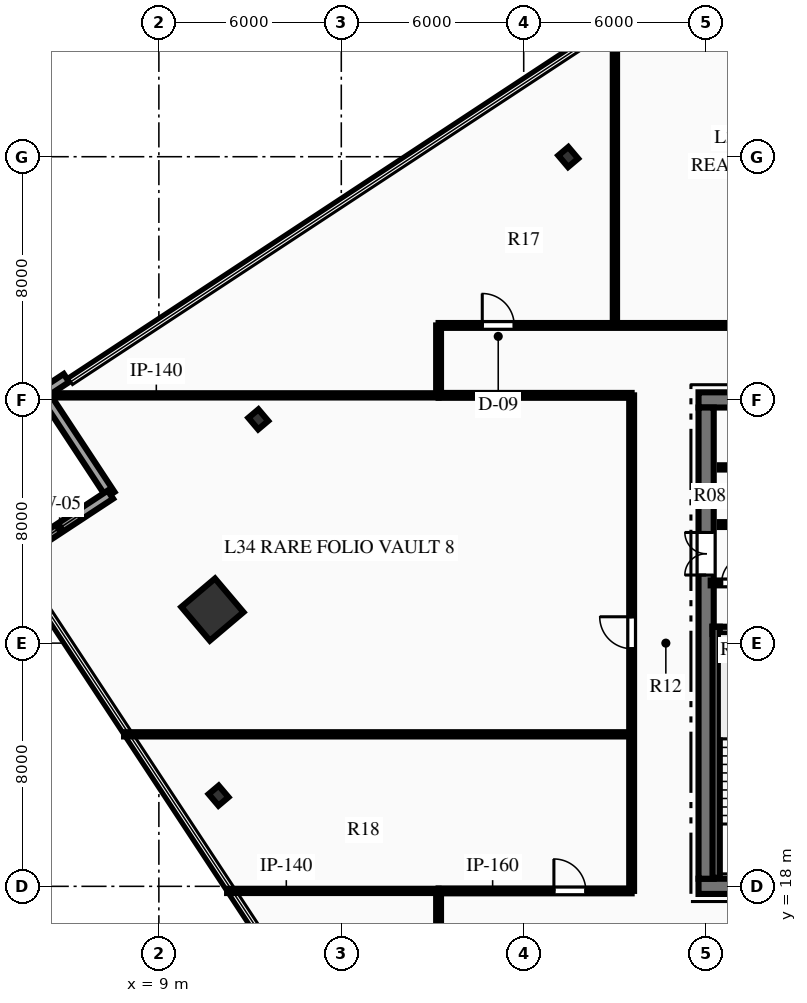
"""IFC4 building model, lengths in metres.
Left out: names, types, materials, properties, quantities, classifications, styles, units other than length and angle.
Written with IfcOpenShell. Run it as: python <this file> out.ifc"""

import sys

from ifc_helpers import new_model, si_unit, direction, frame, frame_2d, origin, origin_2d, place, context, subcontext, project, spatial, rectangle, hollow_rectangle, i_section, extrude, element, fill, save


model = new_model("IFC4")
c1 = context("Model", 3, precision=1e-05, world=origin(), true_north=direction((0.0, 1.0)))
c2 = subcontext(c1, "Body", "Model", "MODEL_VIEW")
j1 = project(units=[si_unit("LENGTHUNIT", "METRE"), si_unit("PLANEANGLEUNIT", "RADIAN")], contexts=[c1])
p1 = place(None, origin())
s1 = spatial("IfcSite", under=j1, at=p1, CompositionType="ELEMENT")
p2 = place(p1, origin())
s2 = spatial("IfcBuilding", under=s1, at=p2, CompositionType="ELEMENT")
p3 = place(p2, frame((0.0, 0.0, 140.7)))
s3 = spatial("IfcBuildingStorey", under=s2, at=p3, CompositionType="ELEMENT", Elevation=140.7)
p4 = place(p3, frame((26.75, 18.0, 0.0), z_axis=(0.0, 0.0, 1.0), x_axis=(1.0, 0.0, 0.0)))
e1 = element("IfcWall", 1, at=p4, inside=s3, PredefinedType="SHEAR", context=c2, shape_type="SweptSolid", body=[
    extrude(rectangle(XDim=18.5, YDim=0.5, at=frame_2d((9.25, 0.0))), origin(), (0.0, 0.0, 1.0), 3.75),
])
p5 = place(p4, frame((7.35, 0.0, 0.0)))
e2 = element("IfcOpeningElement", 2, at=p5, cuts=e1, PredefinedType="OPENING", context=c2, shape_type="SweptSolid", body=[
    extrude(rectangle(XDim=1.1, YDim=2.15, at=frame_2d((0.55, 1.075))), frame((0.0, 0.26, 0.0), z_axis=(0.0, -1.0, 0.0), x_axis=(1.0, 0.0, 0.0)), (0.0, 0.0, 1.0), 0.52),
])
p6 = place(p4, frame((10.05, 0.0, 0.0)))
e3 = element("IfcOpeningElement", 3, at=p6, cuts=e1, PredefinedType="OPENING", context=c2, shape_type="SweptSolid", body=[
    extrude(rectangle(XDim=1.1, YDim=2.15, at=frame_2d((0.55, 1.075))), frame((0.0, 0.26, 0.0), z_axis=(0.0, -1.0, 0.0), x_axis=(1.0, 0.0, 0.0)), (0.0, 0.0, 1.0), 0.52),
])
p7 = place(p3, frame((26.75, 34.0, 0.0), z_axis=(0.0, 0.0, 1.0), x_axis=(1.0, 0.0, 0.0)))
e4 = element("IfcWall", 4, at=p7, inside=s3, PredefinedType="SHEAR", context=c2, shape_type="SweptSolid", body=[
    extrude(rectangle(XDim=18.5, YDim=0.5, at=frame_2d((9.25, 0.0))), origin(), (0.0, 0.0, 1.0), 3.75),
])
p8 = place(p7, frame((13.935, 0.0, 0.0)))
e5 = element("IfcOpeningElement", 5, at=p8, cuts=e4, PredefinedType="OPENING", context=c2, shape_type="SweptSolid", body=[
    extrude(rectangle(XDim=1.1, YDim=2.15, at=frame_2d((0.55, 1.075))), frame((0.0, 0.26, 0.0), z_axis=(0.0, -1.0, 0.0), x_axis=(1.0, 0.0, 0.0)), (0.0, 0.0, 1.0), 0.52),
])
p9 = place(p7, frame((16.185, 0.0, 0.0)))
e6 = element("IfcOpeningElement", 6, at=p9, cuts=e4, PredefinedType="OPENING", context=c2, shape_type="SweptSolid", body=[
    extrude(rectangle(XDim=1.1, YDim=2.15, at=frame_2d((0.55, 1.075))), frame((0.0, 0.26, 0.0), z_axis=(0.0, -1.0, 0.0), x_axis=(1.0, 0.0, 0.0)), (0.0, 0.0, 1.0), 0.52),
])
p10 = place(p3, frame((27.0, 18.25, 0.0), z_axis=(0.0, 0.0, 1.0), x_axis=(0.0, 1.0, 0.0)))
e7 = element("IfcWall", 7, at=p10, inside=s3, PredefinedType="SHEAR", context=c2, shape_type="SweptSolid", body=[
    extrude(rectangle(XDim=15.5, YDim=0.5, at=frame_2d((7.75, 0.0))), origin(), (0.0, 0.0, 1.0), 3.75),
])
p11 = place(p10, frame((9.99, 0.0, 0.0)))
e8 = element("IfcOpeningElement", 8, at=p11, cuts=e7, PredefinedType="OPENING", context=c2, shape_type="SweptSolid", body=[
    extrude(rectangle(XDim=1.4, YDim=2.2, at=frame_2d((0.7, 1.1))), frame((0.0, 0.26, 0.0), z_axis=(0.0, -1.0, 0.0), x_axis=(1.0, 0.0, 0.0)), (0.0, 0.0, 1.0), 0.52),
])
p12 = place(p3, frame((27.21, 26.42, 0.0), z_axis=(0.0, 0.0, 1.0), x_axis=(1.0, 0.0, 0.0)))
e9 = element("IfcWall", 9, at=p12, inside=s3, PredefinedType="SHEAR", context=c2, shape_type="SweptSolid", body=[
    extrude(rectangle(XDim=3.98, YDim=0.24, at=frame_2d((1.99, 0.0))), origin(), (0.0, 0.0, 1.0), 3.75),
])
p13 = place(p3, frame((27.33, 18.28, 0.0), z_axis=(0.0, 0.0, 1.0), x_axis=(0.0, 1.0, 0.0)))
e10 = element("IfcWall", 10, at=p13, inside=s3, PredefinedType="SHEAR", context=c2, shape_type="SweptSolid", body=[
    extrude(rectangle(XDim=8.26, YDim=0.24, at=frame_2d((4.13, 0.0))), origin(), (0.0, 0.0, 1.0), 3.75),
])
p14 = place(p3, frame((10.761, 27.104, 0.0), z_axis=(0.0, 0.0, 1.0), x_axis=(0.763232469783, 0.646123979643, 0.0)))
e11 = element("IfcColumn", 11, at=p14, inside=s3, PredefinedType="COLUMN", context=c2, shape_type="SweptSolid", body=[
    extrude(hollow_rectangle(XDim=1.45, YDim=1.45, WallThickness=0.07, at=origin_2d()), origin(), (0.0, 0.0, 1.0), 3.75),
])
for number, where, z_axis, x_axis in (
    (12, (22.464, 41.99, 0.0), (0.0, 0.0, 1.0), (0.763, 0.646, 0.0)),
    (13, (12.27, 33.36, 0.0), (0.0, 0.0, 1.0), (0.763, 0.646, 0.0)),
    (14, (10.963, 20.983, 0.0), (0.0, 0.0, 1.0), (0.763, 0.646, 0.0)),
):
    element("IfcColumn", number, at=place(p3, frame(where, z_axis=z_axis, x_axis=x_axis)), inside=s3, PredefinedType="COLUMN", context=c2, shape_type="SweptSolid", body=[
        extrude(i_section(OverallWidth=0.432, OverallDepth=0.498, WebThickness=0.056, FlangeThickness=0.089, at=origin_2d()), origin(), (0.0, 0.0, 1.0), 3.75),
    ])
p15 = place(p3, frame((5.207, 34.226, 0.0), z_axis=(0.0, 0.0, 1.0), x_axis=(0.83524987434, 0.549870573331, 0.0)))
e15 = element("IfcWall", 15, at=p15, inside=s3, PredefinedType="STANDARD", context=c2, shape_type="SweptSolid", body=[
    extrude(rectangle(XDim=0.9, YDim=0.32, at=frame_2d((0.45, 0.0))), origin(), (0.0, 0.0, 1.0), 3.46),
])
p16 = place(p3, frame((7.406, 30.885, 0.0), z_axis=(0.0, 0.0, 1.0), x_axis=(-0.549746530767, 0.835331522158, 0.0)))
e16 = element("IfcWall", 16, at=p16, inside=s3, PredefinedType="STANDARD", context=c2, shape_type="SweptSolid", body=[
    extrude(rectangle(XDim=4.0, YDim=0.32, at=frame_2d((2.0, 0.0))), origin(), (0.0, 0.0, 1.0), 3.46),
])
p17 = place(p3, frame((4.065, 28.686, 0.0), z_axis=(0.0, 0.0, 1.0), x_axis=(0.835331522158, 0.549746530767, 0.0)))
e17 = element("IfcWall", 17, at=p17, inside=s3, PredefinedType="STANDARD", context=c2, shape_type="SweptSolid", body=[
    extrude(rectangle(XDim=4.0, YDim=0.32, at=frame_2d((2.0, 0.0))), origin(), (0.0, 0.0, 1.0), 3.46),
])
p18 = place(p17, frame((1.275, 0.0, 0.85)))
e18 = element("IfcOpeningElement", 18, at=p18, cuts=e17, PredefinedType="OPENING", context=c2, shape_type="SweptSolid", body=[
    extrude(rectangle(XDim=1.45, YDim=2.05, at=frame_2d((0.725, 1.025))), frame((0.0, 0.17, 0.0), z_axis=(0.0, -1.0, 0.0), x_axis=(1.0, 0.0, 0.0)), (0.0, 0.0, 1.0), 0.34),
])
p19 = place(p3, frame((27.15, 27.98, 0.0), z_axis=(0.0, 0.0, 1.0), x_axis=(1.0, 0.0, 0.0)))
e19 = element("IfcWall", 19, at=p19, inside=s3, PredefinedType="PARTITIONING", context=c2, shape_type="SweptSolid", body=[
    extrude(rectangle(XDim=4.05, YDim=0.16, at=frame_2d((2.025, 0.0))), origin(), (0.0, 0.0, 1.0), 3.46),
])
p20 = place(p19, frame((0.36, 0.0, 0.0)))
e20 = element("IfcOpeningElement", 20, at=p20, cuts=e19, PredefinedType="OPENING", context=c2, shape_type="SweptSolid", body=[
    extrude(rectangle(XDim=0.9, YDim=2.15, at=frame_2d((0.45, 1.075))), frame((0.0, 0.09, 0.0), z_axis=(0.0, -1.0, 0.0), x_axis=(1.0, 0.0, 0.0)), (0.0, 0.0, 1.0), 0.18),
])
p21 = place(p19, frame((1.63, 0.0, 0.0)))
e21 = element("IfcOpeningElement", 21, at=p21, cuts=e19, PredefinedType="OPENING", context=c2, shape_type="SweptSolid", body=[
    extrude(rectangle(XDim=0.9, YDim=2.15, at=frame_2d((0.45, 1.075))), frame((0.0, 0.09, 0.0), z_axis=(0.0, -1.0, 0.0), x_axis=(1.0, 0.0, 0.0)), (0.0, 0.0, 1.0), 0.18),
])
p22 = place(p19, frame((2.788, 0.0, 0.0)))
e22 = element("IfcOpeningElement", 22, at=p22, cuts=e19, PredefinedType="OPENING", context=c2, shape_type="SweptSolid", body=[
    extrude(rectangle(XDim=0.9, YDim=2.15, at=frame_2d((0.45, 1.075))), frame((0.0, 0.09, 0.0), z_axis=(0.0, -1.0, 0.0), x_axis=(1.0, 0.0, 0.0)), (0.0, 0.0, 1.0), 0.18),
])
p23 = place(p3, frame((27.45, 29.9, 0.0), z_axis=(0.0, 0.0, 1.0), x_axis=(1.0, 0.0, 0.0)))
e23 = element("IfcWall", 23, at=p23, inside=s3, PredefinedType="PARTITIONING", context=c2, shape_type="SweptSolid", body=[
    extrude(rectangle(XDim=4.43, YDim=0.16, at=frame_2d((2.215, 0.0))), origin(), (0.0, 0.0, 1.0), 3.46),
])
p24 = place(p23, frame((1.675, 0.0, 0.0)))
e24 = element("IfcOpeningElement", 24, at=p24, cuts=e23, PredefinedType="OPENING", context=c2, shape_type="SweptSolid", body=[
    extrude(rectangle(XDim=0.95, YDim=2.15, at=frame_2d((0.475, 1.075))), frame((0.0, 0.09, 0.0), z_axis=(0.0, -1.0, 0.0), x_axis=(1.0, 0.0, 0.0)), (0.0, 0.0, 1.0), 0.18),
])
p25 = place(p3, frame((27.45, 31.78, 0.0), z_axis=(0.0, 0.0, 1.0), x_axis=(1.0, 0.0, 0.0)))
e25 = element("IfcWall", 25, at=p25, inside=s3, PredefinedType="PARTITIONING", context=c2, shape_type="SweptSolid", body=[
    extrude(rectangle(XDim=4.35, YDim=0.14, at=frame_2d((2.175, 0.0))), origin(), (0.0, 0.0, 1.0), 3.46),
])
p26 = place(p25, frame((1.7, 0.0, 0.0)))
e26 = element("IfcOpeningElement", 26, at=p26, cuts=e25, PredefinedType="OPENING", context=c2, shape_type="SweptSolid", body=[
    extrude(rectangle(XDim=0.9, YDim=2.15, at=frame_2d((0.45, 1.075))), frame((0.0, 0.08, 0.0), z_axis=(0.0, -1.0, 0.0), x_axis=(1.0, 0.0, 0.0)), (0.0, 0.0, 1.0), 0.16),
])
p27 = place(p3, frame((18.2, 17.85, 0.0), z_axis=(0.0, 0.0, 1.0), x_axis=(1.0, 0.0, 0.0)))
e27 = element("IfcWall", 27, at=p27, inside=s3, PredefinedType="PARTITIONING", context=c2, shape_type="SweptSolid", body=[
    extrude(rectangle(XDim=6.35, YDim=0.16, at=frame_2d((3.175, 0.0))), origin(), (0.0, 0.0, 1.0), 3.46),
])
p28 = place(p27, frame((3.793, 0.0, 0.0)))
e28 = element("IfcOpeningElement", 28, at=p28, cuts=e27, PredefinedType="OPENING", context=c2, shape_type="SweptSolid", body=[
    extrude(rectangle(XDim=1.05, YDim=2.15, at=frame_2d((0.525, 1.075))), frame((0.0, 0.09, 0.0), z_axis=(0.0, -1.0, 0.0), x_axis=(1.0, 0.0, 0.0)), (0.0, 0.0, 1.0), 0.18),
])
p29 = place(p3, frame((18.2, 36.45, 0.0), z_axis=(0.0, 0.0, 1.0), x_axis=(1.0, 0.0, 0.0)))
e29 = element("IfcWall", 29, at=p29, inside=s3, PredefinedType="PARTITIONING", context=c2, shape_type="SweptSolid", body=[
    extrude(rectangle(XDim=35.6, YDim=0.16, at=frame_2d((17.8, 0.0))), origin(), (0.0, 0.0, 1.0), 3.46),
])
p30 = place(p29, frame((1.437, 0.0, 0.0)))
e30 = element("IfcOpeningElement", 30, at=p30, cuts=e29, PredefinedType="OPENING", context=c2, shape_type="SweptSolid", body=[
    extrude(rectangle(XDim=1.05, YDim=2.15, at=frame_2d((0.525, 1.075))), frame((0.0, 0.09, 0.0), z_axis=(0.0, -1.0, 0.0), x_axis=(1.0, 0.0, 0.0)), (0.0, 0.0, 1.0), 0.18),
])
p31 = place(p29, frame((12.535, 0.0, 0.0)))
e31 = element("IfcOpeningElement", 31, at=p31, cuts=e29, PredefinedType="OPENING", context=c2, shape_type="SweptSolid", body=[
    extrude(rectangle(XDim=1.05, YDim=2.15, at=frame_2d((0.525, 1.075))), frame((0.0, 0.09, 0.0), z_axis=(0.0, -1.0, 0.0), x_axis=(1.0, 0.0, 0.0)), (0.0, 0.0, 1.0), 0.18),
])
p32 = place(p29, frame((19.175, 0.0, 0.0)))
e32 = element("IfcOpeningElement", 32, at=p32, cuts=e29, PredefinedType="OPENING", context=c2, shape_type="SweptSolid", body=[
    extrude(rectangle(XDim=1.05, YDim=2.15, at=frame_2d((0.525, 1.075))), frame((0.0, 0.09, 0.0), z_axis=(0.0, -1.0, 0.0), x_axis=(1.0, 0.0, 0.0)), (0.0, 0.0, 1.0), 0.18),
])
p33 = place(p29, frame((29.205, 0.0, 0.0)))
e33 = element("IfcOpeningElement", 33, at=p33, cuts=e29, PredefinedType="OPENING", context=c2, shape_type="SweptSolid", body=[
    extrude(rectangle(XDim=1.05, YDim=2.15, at=frame_2d((0.525, 1.075))), frame((0.0, 0.09, 0.0), z_axis=(0.0, -1.0, 0.0), x_axis=(1.0, 0.0, 0.0)), (0.0, 0.0, 1.0), 0.18),
])
p34 = place(p3, frame((18.2, 34.15, 0.0), z_axis=(0.0, 0.0, 1.0), x_axis=(1.0, 0.0, 0.0)))
e34 = element("IfcWall", 34, at=p34, inside=s3, PredefinedType="PARTITIONING", context=c2, shape_type="SweptSolid", body=[
    extrude(rectangle(XDim=6.35, YDim=0.16, at=frame_2d((3.175, 0.0))), origin(), (0.0, 0.0, 1.0), 3.46),
])
p35 = place(p3, frame((24.55, 17.85, 0.0), z_axis=(0.0, 0.0, 1.0), x_axis=(0.0, 1.0, 0.0)))
e35 = element("IfcWall", 35, at=p35, inside=s3, PredefinedType="PARTITIONING", context=c2, shape_type="SweptSolid", body=[
    extrude(rectangle(XDim=16.3, YDim=0.16, at=frame_2d((8.15, 0.0))), origin(), (0.0, 0.0, 1.0), 3.46),
])
p36 = place(p35, frame((7.967, 0.0, 0.0)))
e36 = element("IfcOpeningElement", 36, at=p36, cuts=e35, PredefinedType="OPENING", context=c2, shape_type="SweptSolid", body=[
    extrude(rectangle(XDim=1.05, YDim=2.15, at=frame_2d((0.525, 1.075))), frame((0.0, 0.09, 0.0), z_axis=(0.0, -1.0, 0.0), x_axis=(1.0, 0.0, 0.0)), (0.0, 0.0, 1.0), 0.18),
])
for number, where, z_axis, x_axis in (
    (37, (18.2, 15.55, 0.0), (0.0, 0.0, 1.0), (0.0, 1.0, 0.0)),
    (38, (18.2, 34.15, 0.0), (0.0, 0.0, 1.0), (0.0, 1.0, 0.0)),
):
    element("IfcWall", number, at=place(p3, frame(where, z_axis=z_axis, x_axis=x_axis)), inside=s3, PredefinedType="PARTITIONING", context=c2, shape_type="SweptSolid", body=[
        extrude(rectangle(XDim=2.3, YDim=0.16, at=frame_2d((1.15, 0.0))), origin(), (0.0, 0.0, 1.0), 3.46),
    ])
p37 = place(p3, frame((11.244, 17.85, 0.0), z_axis=(0.0, 0.0, 1.0), x_axis=(1.0, 0.0, 0.0)))
e39 = element("IfcWall", 39, at=p37, inside=s3, PredefinedType="PARTITIONING", context=c2, shape_type="SweptSolid", body=[
    extrude(rectangle(XDim=6.956, YDim=0.14, at=frame_2d((3.478, 0.0))), origin(), (0.0, 0.0, 1.0), 3.46),
])
p38 = place(p3, frame((5.305, 34.15, 0.0), z_axis=(0.0, 0.0, 1.0), x_axis=(1.0, 0.0, 0.0)))
e40 = element("IfcWall", 40, at=p38, inside=s3, PredefinedType="PARTITIONING", context=c2, shape_type="SweptSolid", body=[
    extrude(rectangle(XDim=12.895, YDim=0.14, at=frame_2d((6.448, 0.0))), origin(), (0.0, 0.0, 1.0), 3.46),
])
p39 = place(p3, frame((24.0, 36.45, 0.0), z_axis=(0.0, 0.0, 1.0), x_axis=(0.0, 1.0, 0.0)))
e41 = element("IfcWall", 41, at=p39, inside=s3, PredefinedType="PARTITIONING", context=c2, shape_type="SweptSolid", body=[
    extrude(rectangle(XDim=10.096, YDim=0.14, at=frame_2d((5.048, 0.0))), origin(), (0.0, 0.0, 1.0), 3.46),
])
p40 = place(p3, frame((7.854, 23.0, 0.0), z_axis=(0.0, 0.0, 1.0), x_axis=(1.0, 0.0, 0.0)))
e42 = element("IfcWall", 42, at=p40, inside=s3, PredefinedType="PARTITIONING", context=c2, shape_type="SweptSolid", body=[
    extrude(rectangle(XDim=16.696, YDim=0.14, at=frame_2d((8.348, 0.0))), origin(), (0.0, 0.0, 1.0), 3.46),
])
p41 = place(p18, origin())
e43 = element("IfcWindow", 43, at=p41, inside=s3, PartitioningType="SINGLE_PANEL", PredefinedType="WINDOW", context=c2, shape_type="SweptSolid", body=[
    extrude(rectangle(XDim=1.45, YDim=2.05, at=frame_2d((0.725, 1.025))), frame((0.0, 0.03, 0.0), z_axis=(0.0, -1.0, 0.0), x_axis=(1.0, 0.0, 0.0)), (0.0, 0.0, 1.0), 0.06),
])
fill(e18, e43)
p42 = place(p20, origin())
e44 = element("IfcDoor", 44, at=p42, inside=s3, OperationType="SINGLE_SWING_RIGHT", PredefinedType="DOOR", context=c2, shape_type="SweptSolid", body=[
    extrude(rectangle(XDim=0.9, YDim=2.15, at=frame_2d((0.45, 1.075))), frame((0.0, 0.025, 0.0), z_axis=(0.0, -1.0, 0.0), x_axis=(1.0, 0.0, 0.0)), (0.0, 0.0, 1.0), 0.05),
])
fill(e20, e44)
p43 = place(p11, origin())
e45 = element("IfcDoor", 45, at=p43, inside=s3, OperationType="DOUBLE_DOOR_SINGLE_SWING", PredefinedType="DOOR", context=c2, shape_type="SweptSolid", body=[
    extrude(rectangle(XDim=1.4, YDim=2.2, at=frame_2d((0.7, 1.1))), frame((0.0, 0.025, 0.0), z_axis=(0.0, -1.0, 0.0), x_axis=(1.0, 0.0, 0.0)), (0.0, 0.0, 1.0), 0.05),
])
fill(e8, e45)
p44 = place(p30, origin())
e46 = element("IfcDoor", 46, at=p44, inside=s3, OperationType="SINGLE_SWING_LEFT", PredefinedType="DOOR", context=c2, shape_type="SweptSolid", body=[
    extrude(rectangle(XDim=1.05, YDim=2.15, at=frame_2d((0.525, 1.075))), frame((0.0, 0.025, 0.0), z_axis=(0.0, -1.0, 0.0), x_axis=(1.0, 0.0, 0.0)), (0.0, 0.0, 1.0), 0.05),
])
fill(e30, e46)
p45 = place(p28, origin())
e47 = element("IfcDoor", 47, at=p45, inside=s3, OperationType="SINGLE_SWING_LEFT", PredefinedType="DOOR", context=c2, shape_type="SweptSolid", body=[
    extrude(rectangle(XDim=1.05, YDim=2.15, at=frame_2d((0.525, 1.075))), frame((0.0, 0.025, 0.0), z_axis=(0.0, -1.0, 0.0), x_axis=(1.0, 0.0, 0.0)), (0.0, 0.0, 1.0), 0.05),
])
fill(e28, e47)
p46 = place(p36, origin())
e48 = element("IfcDoor", 48, at=p46, inside=s3, OperationType="SINGLE_SWING_RIGHT", PredefinedType="DOOR", context=c2, shape_type="SweptSolid", body=[
    extrude(rectangle(XDim=1.05, YDim=2.15, at=frame_2d((0.525, 1.075))), frame((0.0, 0.025, 0.0), z_axis=(0.0, -1.0, 0.0), x_axis=(1.0, 0.0, 0.0)), (0.0, 0.0, 1.0), 0.05),
])
fill(e36, e48)
save(model, sys.argv[1])
